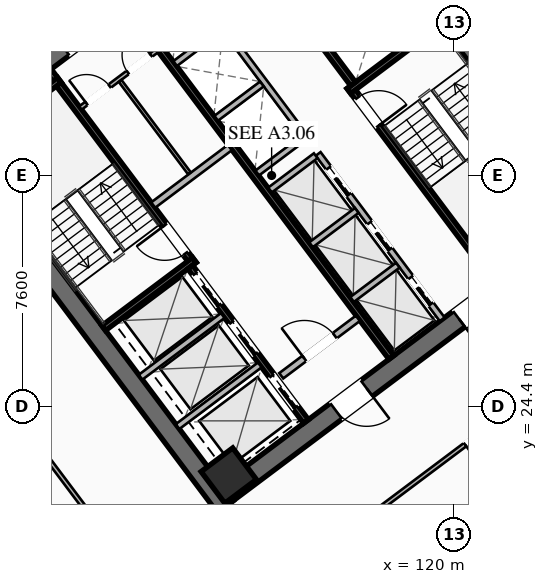
"""IFC4 building model, lengths in metres.
Left out: names, types, materials, properties, quantities, classifications, styles, units other than length and angle.
Written with IfcOpenShell. Run it as: python <this file> out.ifc"""

import sys

from ifc_helpers import new_model, si_unit, direction, frame, frame_2d, origin, origin_2d, place, context, subcontext, project, spatial, rectangle, hollow_rectangle, extrude, element, fill, save


model = new_model("IFC4")
c1 = context("Model", 3, precision=1e-05, world=origin(), true_north=direction((0.0, 1.0)))
c2 = subcontext(c1, "Body", "Model", "MODEL_VIEW")
j1 = project(units=[si_unit("LENGTHUNIT", "METRE"), si_unit("PLANEANGLEUNIT", "RADIAN")], contexts=[c1])
p1 = place(None, origin())
s1 = spatial("IfcSite", under=j1, at=p1, CompositionType="ELEMENT")
p2 = place(p1, origin())
s2 = spatial("IfcBuilding", under=s1, at=p2, CompositionType="ELEMENT")
p3 = place(p2, frame((0.0, 0.0, 53.0)))
s3 = spatial("IfcBuildingStorey", under=s2, at=p3, CompositionType="ELEMENT", Elevation=53.0)
for number, where, z_axis, x_axis in (
    (1, (112.476, 21.107, 0.0), (0.0, 0.0, 1.0), (-0.6, 0.8, 0.0)),
    (2, (115.524, 42.893, 0.0), (0.0, 0.0, 1.0), (0.6, -0.8, 0.0)),
):
    element("IfcWall", number, at=place(p3, frame(where, z_axis=z_axis, x_axis=x_axis)), inside=s3, PredefinedType="SHEAR", context=c2, shape_type="SweptSolid", body=[
        extrude(rectangle(XDim=15.6, YDim=0.65, at=frame_2d((7.8, 0.0))), origin(), (0.0, 0.0, 1.0), 3.55),
    ])
p4 = place(p3, frame((124.429, 30.478, 0.0), z_axis=(0.0, 0.0, 1.0), x_axis=(-0.799998028465, -0.600002628705, 0.0)))
e3 = element("IfcWall", 3, at=p4, inside=s3, PredefinedType="SHEAR", context=c2, shape_type="SweptSolid", body=[
    extrude(rectangle(XDim=14.86, YDim=0.65, at=frame_2d((7.43, 0.0))), origin(), (0.0, 0.0, 1.0), 3.55),
])
p5 = place(p4, frame((9.13, 0.0, 0.0)))
e4 = element("IfcOpeningElement", 4, at=p5, cuts=e3, PredefinedType="OPENING", context=c2, shape_type="SweptSolid", body=[
    extrude(rectangle(XDim=1.25, YDim=2.25, at=frame_2d((0.625, 1.125))), frame((0.0, 0.335, 0.0), z_axis=(0.0, -1.0, 0.0), x_axis=(1.0, 0.0, 0.0)), (0.0, 0.0, 1.0), 0.67),
])
p6 = place(p4, frame((4.08, 0.0, 0.0)))
e5 = element("IfcOpeningElement", 5, at=p6, cuts=e3, PredefinedType="OPENING", context=c2, shape_type="SweptSolid", body=[
    extrude(rectangle(XDim=1.25, YDim=2.25, at=frame_2d((0.625, 1.125))), frame((0.0, 0.335, 0.0), z_axis=(0.0, -1.0, 0.0), x_axis=(1.0, 0.0, 0.0)), (0.0, 0.0, 1.0), 0.67),
])
p7 = place(p3, frame((103.571, 33.522, 0.0), z_axis=(0.0, 0.0, 1.0), x_axis=(0.799998028465, 0.600002628705, 0.0)))
e6 = element("IfcWall", 6, at=p7, inside=s3, PredefinedType="SHEAR", context=c2, shape_type="SweptSolid", body=[
    extrude(rectangle(XDim=14.86, YDim=0.65, at=frame_2d((7.43, 0.0))), origin(), (0.0, 0.0, 1.0), 3.55),
])
p8 = place(p7, frame((4.48, 0.0, 0.0)))
e7 = element("IfcOpeningElement", 7, at=p8, cuts=e6, PredefinedType="OPENING", context=c2, shape_type="SweptSolid", body=[
    extrude(rectangle(XDim=1.25, YDim=2.25, at=frame_2d((0.625, 1.125))), frame((0.0, 0.335, 0.0), z_axis=(0.0, -1.0, 0.0), x_axis=(1.0, 0.0, 0.0)), (0.0, 0.0, 1.0), 0.67),
])
p9 = place(p7, frame((9.53, 0.0, 0.0)))
e8 = element("IfcOpeningElement", 8, at=p9, cuts=e6, PredefinedType="OPENING", context=c2, shape_type="SweptSolid", body=[
    extrude(rectangle(XDim=1.25, YDim=2.25, at=frame_2d((0.625, 1.125))), frame((0.0, 0.335, 0.0), z_axis=(0.0, -1.0, 0.0), x_axis=(1.0, 0.0, 0.0)), (0.0, 0.0, 1.0), 0.67),
])
p10 = place(p3, frame((112.59, 22.13, 0.0), z_axis=(0.0, 0.0, 1.0), x_axis=(0.799999996291, 0.600000004945, 0.0)))
e9 = element("IfcColumn", 9, at=p10, inside=s3, PredefinedType="COLUMN", context=c2, shape_type="SweptSolid", body=[
    extrude(hollow_rectangle(XDim=1.3, YDim=1.3, WallThickness=0.05, at=origin_2d()), origin(), (0.0, 0.0, 1.0), 3.35),
])
p11 = place(p3, frame((111.44, 29.08, 0.0), z_axis=(0.0, 0.0, 1.0), x_axis=(-0.600009827119, 0.799992629566, 0.0)))
e10 = element("IfcWall", 10, at=p11, inside=s3, PredefinedType="SHEAR", context=c2, shape_type="SweptSolid", body=[
    extrude(rectangle(XDim=7.95, YDim=0.2, at=frame_2d((3.975, 0.0))), origin(), (0.0, 0.0, 1.0), 3.35),
])
p12 = place(p11, frame((0.45, 0.0, 0.0)))
e11 = element("IfcOpeningElement", 11, at=p12, cuts=e10, PredefinedType="OPENING", context=c2, shape_type="SweptSolid", body=[
    extrude(rectangle(XDim=1.15, YDim=2.2, at=frame_2d((0.575, 1.1))), frame((0.0, 0.11, 0.0), z_axis=(0.0, -1.0, 0.0), x_axis=(1.0, 0.0, 0.0)), (0.0, 0.0, 1.0), 0.22),
])
for number, where, z_axis, x_axis in (
    (12, (108.476, 26.982, 0.0), (0.0, 0.0, 1.0), (0.8, 0.6, 0.0)),
    (13, (104.036, 32.902, 0.0), (0.0, 0.0, 1.0), (0.8, 0.6, 0.0)),
):
    element("IfcWall", number, at=place(p3, frame(where, z_axis=z_axis, x_axis=x_axis)), inside=s3, PredefinedType="SHEAR", context=c2, shape_type="SweptSolid", body=[
        extrude(rectangle(XDim=3.73, YDim=0.2, at=frame_2d((1.865, 0.0))), origin(), (0.0, 0.0, 1.0), 3.35),
    ])
p13 = place(p3, frame((116.56, 34.92, 0.0), z_axis=(0.0, 0.0, 1.0), x_axis=(0.600009827119, -0.799992629566, 0.0)))
e14 = element("IfcWall", 14, at=p13, inside=s3, PredefinedType="SHEAR", context=c2, shape_type="SweptSolid", body=[
    extrude(rectangle(XDim=7.95, YDim=0.2, at=frame_2d((3.975, 0.0))), origin(), (0.0, 0.0, 1.0), 3.35),
])
p14 = place(p13, frame((0.45, 0.0, 0.0)))
e15 = element("IfcOpeningElement", 15, at=p14, cuts=e14, PredefinedType="OPENING", context=c2, shape_type="SweptSolid", body=[
    extrude(rectangle(XDim=1.15, YDim=2.2, at=frame_2d((0.575, 1.1))), frame((0.0, 0.11, 0.0), z_axis=(0.0, -1.0, 0.0), x_axis=(1.0, 0.0, 0.0)), (0.0, 0.0, 1.0), 0.22),
])
p15 = place(p3, frame((116.54, 34.78, 0.0), z_axis=(0.0, 0.0, 1.0), x_axis=(0.799984290658, 0.600020945218, 0.0)))
e16 = element("IfcWall", 16, at=p15, inside=s3, PredefinedType="SHEAR", context=c2, shape_type="SweptSolid", body=[
    extrude(rectangle(XDim=3.73, YDim=0.2, at=frame_2d((1.865, 0.0))), origin(), (0.0, 0.0, 1.0), 3.35),
])
p16 = place(p3, frame((117.938, 26.016, 0.0), z_axis=(0.0, 0.0, 1.0), x_axis=(-0.600005463273, 0.799995902516, 0.0)))
e17 = element("IfcWall", 17, at=p16, inside=s3, PredefinedType="SHEAR", context=c2, shape_type="SweptSolid", body=[
    extrude(rectangle(XDim=14.3, YDim=0.2, at=frame_2d((7.15, 0.0))), origin(), (0.0, 0.0, 1.0), 3.35),
])
p17 = place(p3, frame((110.104, 31.028, 0.0), z_axis=(0.0, 0.0, 1.0), x_axis=(0.800018601094, 0.59997519774, 0.0)))
e18 = element("IfcWall", 18, at=p17, inside=s3, PredefinedType="SOLIDWALL", context=c2, shape_type="SweptSolid", body=[
    extrude(rectangle(XDim=3.15, YDim=0.22, at=frame_2d((1.575, 0.0))), origin(), (0.0, 0.0, 1.0), 2.703),
])
p18 = place(p3, frame((114.316, 25.412, 0.0), z_axis=(0.0, 0.0, 1.0), x_axis=(0.800018601094, 0.59997519774, 0.0)))
e19 = element("IfcWall", 19, at=p18, inside=s3, PredefinedType="SOLIDWALL", context=c2, shape_type="SweptSolid", body=[
    extrude(rectangle(XDim=3.15, YDim=0.22, at=frame_2d((1.575, 0.0))), origin(), (0.0, 0.0, 1.0), 2.703),
])
p19 = place(p18, frame((0.95, 0.0, 0.0)))
e20 = element("IfcOpeningElement", 20, at=p19, cuts=e19, PredefinedType="OPENING", context=c2, shape_type="SweptSolid", body=[
    extrude(rectangle(XDim=1.25, YDim=2.25, at=frame_2d((0.625, 1.125))), frame((0.0, 0.12, 0.0), z_axis=(0.0, -1.0, 0.0), x_axis=(1.0, 0.0, 0.0)), (0.0, 0.0, 1.0), 0.24),
])
p20 = place(p3, frame((115.13, 23.91, 0.0), z_axis=(0.0, 0.0, 1.0), x_axis=(-0.599975393228, 0.800018454488, 0.0)))
e21 = element("IfcWall", 21, at=p20, inside=s3, PredefinedType="SHEAR", context=c2, shape_type="SweptSolid", body=[
    extrude(rectangle(XDim=6.35, YDim=0.2, at=frame_2d((3.175, 0.0))), origin(), (0.0, 0.0, 1.0), 3.35),
])
p21 = place(p20, frame((4.775, 0.0, 0.0)))
e22 = element("IfcOpeningElement", 22, at=p21, cuts=e21, PredefinedType="OPENING", context=c2, shape_type="SweptSolid", body=[
    extrude(rectangle(XDim=1.3, YDim=2.25, at=frame_2d((0.65, 1.125))), frame((0.0, 0.11, 0.0), z_axis=(0.0, -1.0, 0.0), x_axis=(1.0, 0.0, 0.0)), (0.0, 0.0, 1.0), 0.22),
])
p22 = place(p20, frame((2.775, 0.0, 0.0)))
e23 = element("IfcOpeningElement", 23, at=p22, cuts=e21, PredefinedType="OPENING", context=c2, shape_type="SweptSolid", body=[
    extrude(rectangle(XDim=1.3, YDim=2.25, at=frame_2d((0.65, 1.125))), frame((0.0, 0.11, 0.0), z_axis=(0.0, -1.0, 0.0), x_axis=(1.0, 0.0, 0.0)), (0.0, 0.0, 1.0), 0.22),
])
p23 = place(p20, frame((0.575, 0.0, 0.0)))
e24 = element("IfcOpeningElement", 24, at=p23, cuts=e21, PredefinedType="OPENING", context=c2, shape_type="SweptSolid", body=[
    extrude(rectangle(XDim=1.3, YDim=2.25, at=frame_2d((0.65, 1.125))), frame((0.0, 0.11, 0.0), z_axis=(0.0, -1.0, 0.0), x_axis=(1.0, 0.0, 0.0)), (0.0, 0.0, 1.0), 0.22),
])
for number, where, z_axis, x_axis in (
    (25, (110.906, 23.742, 0.0), (0.0, 0.0, 1.0), (0.8, 0.6, 0.0)),
    (26, (109.688, 25.366, 0.0), (0.0, 0.0, 1.0), (0.8, 0.6, 0.0)),
):
    element("IfcWall", number, at=place(p3, frame(where, z_axis=z_axis, x_axis=x_axis)), inside=s3, PredefinedType="SOLIDWALL", context=c2, shape_type="SweptSolid", body=[
        extrude(rectangle(XDim=3.38, YDim=0.2, at=frame_2d((1.69, 0.0))), origin(), (0.0, 0.0, 1.0), 3.35),
    ])
p24 = place(p3, frame((112.87, 40.09, 0.0), z_axis=(0.0, 0.0, 1.0), x_axis=(0.599975393228, -0.800018454488, 0.0)))
e27 = element("IfcWall", 27, at=p24, inside=s3, PredefinedType="SHEAR", context=c2, shape_type="SweptSolid", body=[
    extrude(rectangle(XDim=6.35, YDim=0.2, at=frame_2d((3.175, 0.0))), origin(), (0.0, 0.0, 1.0), 3.35),
])
p25 = place(p3, frame((107.71, 34.22, 0.0), z_axis=(0.0, 0.0, 1.0), x_axis=(0.799981399002, 0.60002480053, 0.0)))
e28 = element("IfcWall", 28, at=p25, inside=s3, PredefinedType="PARTITIONING", context=c2, shape_type="SweptSolid", body=[
    extrude(rectangle(XDim=3.15, YDim=0.135, at=frame_2d((1.575, 0.0))), origin(), (0.0, 0.0, 1.0), 2.703),
])
p26 = place(p25, frame((0.25, 0.0, 0.0)))
e29 = element("IfcOpeningElement", 29, at=p26, cuts=e28, PredefinedType="OPENING", context=c2, shape_type="SweptSolid", body=[
    extrude(rectangle(XDim=0.95, YDim=2.05, at=frame_2d((0.475, 1.025))), frame((0.0, 0.077, 0.0), z_axis=(0.0, -1.0, 0.0), x_axis=(1.0, 0.0, 0.0)), (0.0, 0.0, 1.0), 0.155),
])
p27 = place(p25, frame((1.95, 0.0, 0.0)))
e30 = element("IfcOpeningElement", 30, at=p27, cuts=e28, PredefinedType="OPENING", context=c2, shape_type="SweptSolid", body=[
    extrude(rectangle(XDim=0.95, YDim=2.05, at=frame_2d((0.475, 1.025))), frame((0.0, 0.077, 0.0), z_axis=(0.0, -1.0, 0.0), x_axis=(1.0, 0.0, 0.0)), (0.0, 0.0, 1.0), 0.155),
])
p28 = place(p3, frame((111.296, 32.072, 0.0), z_axis=(0.0, 0.0, 1.0), x_axis=(-0.59995887973, 0.800030838552, 0.0)))
e31 = element("IfcWall", 31, at=p28, inside=s3, PredefinedType="PARTITIONING", context=c2, shape_type="SweptSolid", body=[
    extrude(rectangle(XDim=3.8, YDim=0.11, at=frame_2d((1.9, 0.0))), origin(), (0.0, 0.0, 1.0), 2.703),
])
p29 = place(p3, frame((119.61, 27.27, 0.0), z_axis=(0.0, 0.0, 1.0), x_axis=(-0.600011488909, 0.79999138319, 0.0)))
e32 = element("IfcWall", 32, at=p29, inside=s3, PredefinedType="SOLIDWALL", context=c2, shape_type="SweptSolid", body=[
    extrude(rectangle(XDim=6.8, YDim=0.2, at=frame_2d((3.4, 0.0))), origin(), (0.0, 0.0, 1.0), 3.35),
])
p30 = place(p29, frame((0.625, 0.0, 0.0)))
e33 = element("IfcOpeningElement", 33, at=p30, cuts=e32, PredefinedType="OPENING", context=c2, shape_type="SweptSolid", body=[
    extrude(rectangle(XDim=1.1, YDim=2.2, at=frame_2d((0.55, 1.1))), frame((0.0, 0.11, 0.0), z_axis=(0.0, -1.0, 0.0), x_axis=(1.0, 0.0, 0.0)), (0.0, 0.0, 1.0), 0.22),
])
p31 = place(p29, frame((2.875, 0.0, 0.0)))
e34 = element("IfcOpeningElement", 34, at=p31, cuts=e32, PredefinedType="OPENING", context=c2, shape_type="SweptSolid", body=[
    extrude(rectangle(XDim=1.1, YDim=2.2, at=frame_2d((0.55, 1.1))), frame((0.0, 0.11, 0.0), z_axis=(0.0, -1.0, 0.0), x_axis=(1.0, 0.0, 0.0)), (0.0, 0.0, 1.0), 0.22),
])
p32 = place(p29, frame((5.125, 0.0, 0.0)))
e35 = element("IfcOpeningElement", 35, at=p32, cuts=e32, PredefinedType="OPENING", context=c2, shape_type="SweptSolid", body=[
    extrude(rectangle(XDim=1.1, YDim=2.2, at=frame_2d((0.55, 1.1))), frame((0.0, 0.11, 0.0), z_axis=(0.0, -1.0, 0.0), x_axis=(1.0, 0.0, 0.0)), (0.0, 0.0, 1.0), 0.22),
])
p33 = place(p3, frame((116.646, 27.922, 0.0), z_axis=(0.0, 0.0, 1.0), x_axis=(0.8, 0.6, 0.0)))
e36 = element("IfcWall", 36, at=p33, inside=s3, PredefinedType="SOLIDWALL", context=c2, shape_type="SweptSolid", body=[
    extrude(rectangle(XDim=1.88, YDim=0.2, at=frame_2d((0.94, 0.0))), origin(), (0.0, 0.0, 1.0), 3.35),
])
p34 = place(p3, frame((115.296, 29.722, 0.0), z_axis=(0.0, 0.0, 1.0), x_axis=(0.799984418148, 0.600020775241, 0.0)))
e37 = element("IfcWall", 37, at=p34, inside=s3, PredefinedType="SOLIDWALL", context=c2, shape_type="SweptSolid", body=[
    extrude(rectangle(XDim=1.88, YDim=0.2, at=frame_2d((0.94, 0.0))), origin(), (0.0, 0.0, 1.0), 3.35),
])
p35 = place(p3, frame((113.946, 31.522, 0.0), z_axis=(0.0, 0.0, 1.0), x_axis=(0.8, 0.6, 0.0)))
e38 = element("IfcWall", 38, at=p35, inside=s3, PredefinedType="SOLIDWALL", context=c2, shape_type="SweptSolid", body=[
    extrude(rectangle(XDim=1.88, YDim=0.2, at=frame_2d((0.94, 0.0))), origin(), (0.0, 0.0, 1.0), 3.35),
])
p36 = place(p3, frame((115.11, 33.27, 0.0), z_axis=(0.0, 0.0, 1.0), x_axis=(-0.600011488909, 0.79999138319, 0.0)))
e39 = element("IfcWall", 39, at=p36, inside=s3, PredefinedType="SOLIDWALL", context=c2, shape_type="SweptSolid", body=[
    extrude(rectangle(XDim=6.8, YDim=0.2, at=frame_2d((3.4, 0.0))), origin(), (0.0, 0.0, 1.0), 3.35),
])
p37 = place(p3, frame((113.526, 32.082, 0.0), z_axis=(0.0, 0.0, 1.0), x_axis=(0.800046745961, 0.599937666993, 0.0)))
e40 = element("IfcWall", 40, at=p37, inside=s3, PredefinedType="SOLIDWALL", context=c2, shape_type="SweptSolid", body=[
    extrude(rectangle(XDim=1.88, YDim=0.2, at=frame_2d((0.94, 0.0))), origin(), (0.0, 0.0, 1.0), 3.35),
])
p38 = place(p3, frame((112.176, 33.882, 0.0), z_axis=(0.0, 0.0, 1.0), x_axis=(0.8, 0.6, 0.0)))
e41 = element("IfcWall", 41, at=p38, inside=s3, PredefinedType="SOLIDWALL", context=c2, shape_type="SweptSolid", body=[
    extrude(rectangle(XDim=1.88, YDim=0.2, at=frame_2d((0.94, 0.0))), origin(), (0.0, 0.0, 1.0), 3.35),
])
p39 = place(p3, frame((110.826, 35.682, 0.0), z_axis=(0.0, 0.0, 1.0), x_axis=(0.799984418148, 0.600020775241, 0.0)))
e42 = element("IfcWall", 42, at=p39, inside=s3, PredefinedType="SOLIDWALL", context=c2, shape_type="SweptSolid", body=[
    extrude(rectangle(XDim=1.88, YDim=0.2, at=frame_2d((0.94, 0.0))), origin(), (0.0, 0.0, 1.0), 3.35),
])
p40 = place(p3, frame((98.276, 33.832, 0.0), z_axis=(0.0, 0.0, 1.0), x_axis=(0.800001944698, 0.59999740706, 0.0)))
e43 = element("IfcWall", 43, at=p40, inside=s3, PredefinedType="PARTITIONING", context=c2, shape_type="SweptSolid", body=[
    extrude(rectangle(XDim=30.13, YDim=0.135, at=frame_2d((15.065, 0.0))), origin(), (0.0, 0.0, 1.0), 2.703),
])
p41 = place(p40, frame((0.3, 0.0, 0.0)))
e44 = element("IfcOpeningElement", 44, at=p41, cuts=e43, PredefinedType="OPENING", context=c2, shape_type="SweptSolid", body=[
    extrude(rectangle(XDim=0.95, YDim=2.05, at=frame_2d((0.475, 1.025))), frame((0.0, 0.077, 0.0), z_axis=(0.0, -1.0, 0.0), x_axis=(1.0, 0.0, 0.0)), (0.0, 0.0, 1.0), 0.155),
])
p42 = place(p40, frame((10.95, 0.0, 0.0)))
e45 = element("IfcOpeningElement", 45, at=p42, cuts=e43, PredefinedType="OPENING", context=c2, shape_type="SweptSolid", body=[
    extrude(rectangle(XDim=0.95, YDim=2.05, at=frame_2d((0.475, 1.025))), frame((0.0, 0.077, 0.0), z_axis=(0.0, -1.0, 0.0), x_axis=(1.0, 0.0, 0.0)), (0.0, 0.0, 1.0), 0.155),
])
p43 = place(p40, frame((14.95, 0.0, 0.0)))
e46 = element("IfcOpeningElement", 46, at=p43, cuts=e43, PredefinedType="OPENING", context=c2, shape_type="SweptSolid", body=[
    extrude(rectangle(XDim=0.95, YDim=2.05, at=frame_2d((0.475, 1.025))), frame((0.0, 0.077, 0.0), z_axis=(0.0, -1.0, 0.0), x_axis=(1.0, 0.0, 0.0)), (0.0, 0.0, 1.0), 0.155),
])
p44 = place(p40, frame((28.88, 0.0, 0.0)))
e47 = element("IfcOpeningElement", 47, at=p44, cuts=e43, PredefinedType="OPENING", context=c2, shape_type="SweptSolid", body=[
    extrude(rectangle(XDim=0.95, YDim=2.05, at=frame_2d((0.475, 1.025))), frame((0.0, 0.077, 0.0), z_axis=(0.0, -1.0, 0.0), x_axis=(1.0, 0.0, 0.0)), (0.0, 0.0, 1.0), 0.155),
])
p45 = place(p3, frame((135.46, 34.47, 0.0), z_axis=(0.0, 0.0, 1.0), x_axis=(-0.800001944698, -0.59999740706, 0.0)))
e48 = element("IfcWall", 48, at=p45, inside=s3, PredefinedType="PARTITIONING", context=c2, shape_type="SweptSolid", body=[
    extrude(rectangle(XDim=30.13, YDim=0.135, at=frame_2d((15.065, 0.0))), origin(), (0.0, 0.0, 1.0), 2.703),
])
p46 = place(p45, frame((28.8, 0.0, 0.0)))
e49 = element("IfcOpeningElement", 49, at=p46, cuts=e48, PredefinedType="OPENING", context=c2, shape_type="SweptSolid", body=[
    extrude(rectangle(XDim=0.95, YDim=2.05, at=frame_2d((0.475, 1.025))), frame((0.0, 0.077, 0.0), z_axis=(0.0, -1.0, 0.0), x_axis=(1.0, 0.0, 0.0)), (0.0, 0.0, 1.0), 0.155),
])
p47 = place(p45, frame((17.921, 0.0, 0.0)))
e50 = element("IfcOpeningElement", 50, at=p47, cuts=e48, PredefinedType="OPENING", context=c2, shape_type="SweptSolid", body=[
    extrude(rectangle(XDim=0.95, YDim=2.05, at=frame_2d((0.475, 1.025))), frame((0.0, 0.077, 0.0), z_axis=(0.0, -1.0, 0.0), x_axis=(1.0, 0.0, 0.0)), (0.0, 0.0, 1.0), 0.155),
])
p48 = place(p45, frame((14.129, 0.0, 0.0)))
e51 = element("IfcOpeningElement", 51, at=p48, cuts=e48, PredefinedType="OPENING", context=c2, shape_type="SweptSolid", body=[
    extrude(rectangle(XDim=0.95, YDim=2.05, at=frame_2d((0.475, 1.025))), frame((0.0, 0.077, 0.0), z_axis=(0.0, -1.0, 0.0), x_axis=(1.0, 0.0, 0.0)), (0.0, 0.0, 1.0), 0.155),
])
p49 = place(p45, frame((0.38, 0.0, 0.0)))
e52 = element("IfcOpeningElement", 52, at=p49, cuts=e48, PredefinedType="OPENING", context=c2, shape_type="SweptSolid", body=[
    extrude(rectangle(XDim=0.95, YDim=2.05, at=frame_2d((0.475, 1.025))), frame((0.0, 0.077, 0.0), z_axis=(0.0, -1.0, 0.0), x_axis=(1.0, 0.0, 0.0)), (0.0, 0.0, 1.0), 0.155),
])
p50 = place(p3, frame((111.308, 16.456, 0.0), z_axis=(0.0, 0.0, 1.0), x_axis=(-0.600003610192, 0.799997292343, 0.0)))
e53 = element("IfcWall", 53, at=p50, inside=s3, PredefinedType="PARTITIONING", context=c2, shape_type="SweptSolid", body=[
    extrude(rectangle(XDim=21.64, YDim=0.135, at=frame_2d((10.82, 0.0))), origin(), (0.0, 0.0, 1.0), 2.703),
])
p51 = place(p50, frame((0.3, 0.0, 0.0)))
e54 = element("IfcOpeningElement", 54, at=p51, cuts=e53, PredefinedType="OPENING", context=c2, shape_type="SweptSolid", body=[
    extrude(rectangle(XDim=0.95, YDim=2.05, at=frame_2d((0.475, 1.025))), frame((0.0, 0.077, 0.0), z_axis=(0.0, -1.0, 0.0), x_axis=(1.0, 0.0, 0.0)), (0.0, 0.0, 1.0), 0.155),
])
p52 = place(p5, origin())
e55 = element("IfcDoor", 55, at=p52, inside=s3, OperationType="SINGLE_SWING_LEFT", PredefinedType="DOOR", context=c2, shape_type="SweptSolid", body=[
    extrude(rectangle(XDim=1.25, YDim=2.25, at=frame_2d((0.625, 1.125))), frame((0.0, 0.025, 0.0), z_axis=(0.0, -1.0, 0.0), x_axis=(1.0, 0.0, 0.0)), (0.0, 0.0, 1.0), 0.05),
])
fill(e4, e55)
p53 = place(p6, origin())
e56 = element("IfcDoor", 56, at=p53, inside=s3, OperationType="SINGLE_SWING_RIGHT", PredefinedType="DOOR", context=c2, shape_type="SweptSolid", body=[
    extrude(rectangle(XDim=1.25, YDim=2.25, at=frame_2d((0.625, 1.125))), frame((0.0, 0.025, 0.0), z_axis=(0.0, -1.0, 0.0), x_axis=(1.0, 0.0, 0.0)), (0.0, 0.0, 1.0), 0.05),
])
fill(e5, e56)
p54 = place(p12, origin())
e57 = element("IfcDoor", 57, at=p54, inside=s3, OperationType="SINGLE_SWING_RIGHT", PredefinedType="DOOR", context=c2, shape_type="SweptSolid", body=[
    extrude(rectangle(XDim=1.15, YDim=2.2, at=frame_2d((0.575, 1.1))), frame((0.0, 0.025, 0.0), z_axis=(0.0, -1.0, 0.0), x_axis=(1.0, 0.0, 0.0)), (0.0, 0.0, 1.0), 0.05),
])
fill(e11, e57)
p55 = place(p14, origin())
e58 = element("IfcDoor", 58, at=p55, inside=s3, OperationType="SINGLE_SWING_RIGHT", PredefinedType="DOOR", context=c2, shape_type="SweptSolid", body=[
    extrude(rectangle(XDim=1.15, YDim=2.2, at=frame_2d((0.575, 1.1))), frame((0.0, 0.025, 0.0), z_axis=(0.0, -1.0, 0.0), x_axis=(1.0, 0.0, 0.0)), (0.0, 0.0, 1.0), 0.05),
])
fill(e15, e58)
p56 = place(p19, origin())
e59 = element("IfcDoor", 59, at=p56, inside=s3, OperationType="SINGLE_SWING_LEFT", PredefinedType="DOOR", context=c2, shape_type="SweptSolid", body=[
    extrude(rectangle(XDim=1.25, YDim=2.25, at=frame_2d((0.625, 1.125))), frame((0.0, 0.025, 0.0), z_axis=(0.0, -1.0, 0.0), x_axis=(1.0, 0.0, 0.0)), (0.0, 0.0, 1.0), 0.05),
])
fill(e20, e59)
p57 = place(p26, origin())
e60 = element("IfcDoor", 60, at=p57, inside=s3, OperationType="SINGLE_SWING_LEFT", PredefinedType="DOOR", context=c2, shape_type="SweptSolid", body=[
    extrude(rectangle(XDim=0.95, YDim=2.05, at=frame_2d((0.475, 1.025))), frame((0.0, 0.025, 0.0), z_axis=(0.0, -1.0, 0.0), x_axis=(1.0, 0.0, 0.0)), (0.0, 0.0, 1.0), 0.05),
])
fill(e29, e60)
p58 = place(p27, origin())
e61 = element("IfcDoor", 61, at=p58, inside=s3, OperationType="SINGLE_SWING_RIGHT", PredefinedType="DOOR", context=c2, shape_type="SweptSolid", body=[
    extrude(rectangle(XDim=0.95, YDim=2.05, at=frame_2d((0.475, 1.025))), frame((0.0, 0.025, 0.0), z_axis=(0.0, -1.0, 0.0), x_axis=(1.0, 0.0, 0.0)), (0.0, 0.0, 1.0), 0.05),
])
fill(e30, e61)
p59 = place(p47, origin())
e62 = element("IfcDoor", 62, at=p59, inside=s3, OperationType="SINGLE_SWING_RIGHT", PredefinedType="DOOR", context=c2, shape_type="SweptSolid", body=[
    extrude(rectangle(XDim=0.95, YDim=2.05, at=frame_2d((0.475, 1.025))), frame((0.0, 0.025, 0.0), z_axis=(0.0, -1.0, 0.0), x_axis=(1.0, 0.0, 0.0)), (0.0, 0.0, 1.0), 0.05),
])
fill(e50, e62)
p60 = place(p21, origin())
e63 = element("IfcDoor", 63, at=p60, inside=s3, OperationType="SLIDING_TO_LEFT", PredefinedType="DOOR", context=c2, shape_type="SweptSolid", body=[
    extrude(rectangle(XDim=1.3, YDim=2.25, at=frame_2d((0.65, 1.125))), frame((0.0, 0.025, 0.0), z_axis=(0.0, -1.0, 0.0), x_axis=(1.0, 0.0, 0.0)), (0.0, 0.0, 1.0), 0.05),
])
fill(e22, e63)
p61 = place(p22, origin())
e64 = element("IfcDoor", 64, at=p61, inside=s3, OperationType="SLIDING_TO_LEFT", PredefinedType="DOOR", context=c2, shape_type="SweptSolid", body=[
    extrude(rectangle(XDim=1.3, YDim=2.25, at=frame_2d((0.65, 1.125))), frame((0.0, 0.025, 0.0), z_axis=(0.0, -1.0, 0.0), x_axis=(1.0, 0.0, 0.0)), (0.0, 0.0, 1.0), 0.05),
])
fill(e23, e64)
p62 = place(p23, origin())
e65 = element("IfcDoor", 65, at=p62, inside=s3, OperationType="SLIDING_TO_LEFT", PredefinedType="DOOR", context=c2, shape_type="SweptSolid", body=[
    extrude(rectangle(XDim=1.3, YDim=2.25, at=frame_2d((0.65, 1.125))), frame((0.0, 0.025, 0.0), z_axis=(0.0, -1.0, 0.0), x_axis=(1.0, 0.0, 0.0)), (0.0, 0.0, 1.0), 0.05),
])
fill(e24, e65)
p63 = place(p30, origin())
e66 = element("IfcDoor", 66, at=p63, inside=s3, OperationType="SLIDING_TO_LEFT", PredefinedType="DOOR", context=c2, shape_type="SweptSolid", body=[
    extrude(rectangle(XDim=1.1, YDim=2.2, at=frame_2d((0.55, 1.1))), frame((0.0, 0.025, 0.0), z_axis=(0.0, -1.0, 0.0), x_axis=(1.0, 0.0, 0.0)), (0.0, 0.0, 1.0), 0.05),
])
fill(e33, e66)
p64 = place(p31, origin())
e67 = element("IfcDoor", 67, at=p64, inside=s3, OperationType="SLIDING_TO_LEFT", PredefinedType="DOOR", context=c2, shape_type="SweptSolid", body=[
    extrude(rectangle(XDim=1.1, YDim=2.2, at=frame_2d((0.55, 1.1))), frame((0.0, 0.025, 0.0), z_axis=(0.0, -1.0, 0.0), x_axis=(1.0, 0.0, 0.0)), (0.0, 0.0, 1.0), 0.05),
])
fill(e34, e67)
p65 = place(p32, origin())
e68 = element("IfcDoor", 68, at=p65, inside=s3, OperationType="SLIDING_TO_LEFT", PredefinedType="DOOR", context=c2, shape_type="SweptSolid", body=[
    extrude(rectangle(XDim=1.1, YDim=2.2, at=frame_2d((0.55, 1.1))), frame((0.0, 0.025, 0.0), z_axis=(0.0, -1.0, 0.0), x_axis=(1.0, 0.0, 0.0)), (0.0, 0.0, 1.0), 0.05),
])
fill(e35, e68)
save(model, sys.argv[1])
